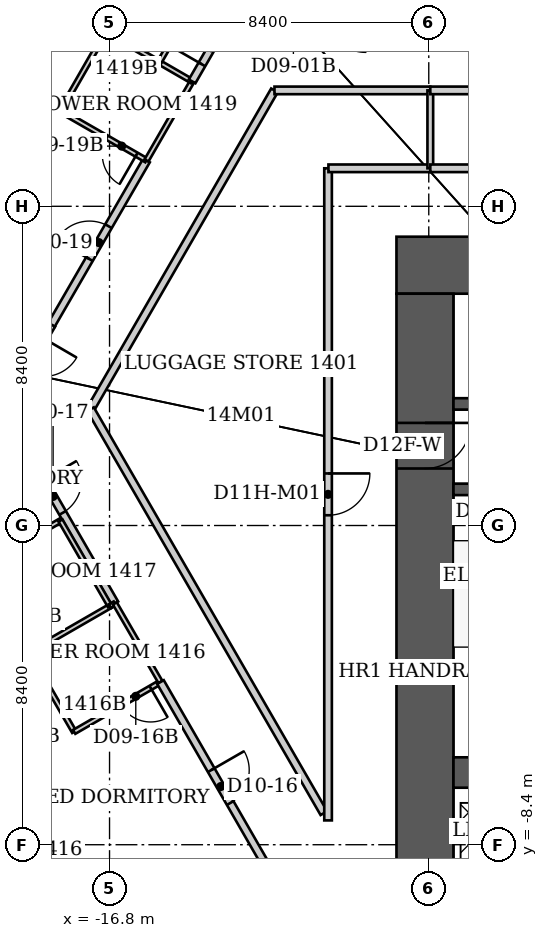
"""IFC4 building model, lengths in metres.
Left out: names, types, materials, properties, quantities, classifications, styles, units other than length and angle.
Written with IfcOpenShell. Run it as: python <this file> out.ifc"""

import sys

from ifc_helpers import new_model, si_unit, direction, frame, frame_2d, origin, place, context, subcontext, project, spatial, rectangle, extrude, element, fill, save


model = new_model("IFC4")
c1 = context("Model", 3, precision=1e-05, world=origin(), true_north=direction((0.0, 1.0)))
c2 = subcontext(c1, "Body", "Model", "MODEL_VIEW")
j1 = project(units=[si_unit("LENGTHUNIT", "METRE"), si_unit("PLANEANGLEUNIT", "RADIAN")], contexts=[c1])
p1 = place(None, origin())
s1 = spatial("IfcSite", under=j1, at=p1, CompositionType="ELEMENT")
p2 = place(p1, origin())
s2 = spatial("IfcBuilding", under=s1, at=p2, CompositionType="ELEMENT")
p3 = place(p2, frame((0.0, 0.0, 61.0)))
s3 = spatial("IfcBuildingStorey", under=s2, at=p3, CompositionType="ELEMENT", Elevation=61.0)
p4 = place(p3, frame((-9.25, 6.85, 0.0), z_axis=(0.0, 0.0, 1.0), x_axis=(1.0, 0.0, 0.0)))
e1 = element("IfcWall", 1, at=p4, inside=s3, PredefinedType="SHEAR", context=c2, shape_type="SweptSolid", body=[
    extrude(rectangle(XDim=18.5, YDim=1.5, at=frame_2d((9.25, 0.0))), origin(), (0.0, 0.0, 1.0), 3.8),
])
p5 = place(p3, frame((-8.5, -9.2, 0.0), z_axis=(0.0, 0.0, 1.0), x_axis=(0.0, 1.0, 0.0)))
e2 = element("IfcWall", 2, at=p5, inside=s3, PredefinedType="SHEAR", context=c2, shape_type="SweptSolid", body=[
    extrude(rectangle(XDim=15.3, YDim=1.5, at=frame_2d((7.65, 0.0))), origin(), (0.0, 0.0, 1.0), 3.8),
])
p6 = place(p5, frame((10.7, 0.0, 0.0)))
e3 = element("IfcOpeningElement", 3, at=p6, cuts=e2, PredefinedType="OPENING", context=c2, shape_type="SweptSolid", body=[
    extrude(rectangle(XDim=1.2, YDim=2.2, at=frame_2d((0.6, 1.1))), frame((0.0, 0.75, 0.0), z_axis=(0.0, -1.0, 0.0), x_axis=(1.0, 0.0, 0.0)), (0.0, 0.0, 1.0), 1.5),
])
p7 = place(p3, frame((-7.75, -6.5, 0.0), z_axis=(0.0, 0.0, 1.0), x_axis=(1.0, 0.0, 0.0)))
e4 = element("IfcWall", 4, at=p7, inside=s3, PredefinedType="SHEAR", context=c2, shape_type="SweptSolid", body=[
    extrude(rectangle(XDim=15.5, YDim=0.8, at=frame_2d((7.75, 0.0))), origin(), (0.0, 0.0, 1.0), 3.8),
])
p8 = place(p3, frame((-7.75, 0.95, 0.0), z_axis=(0.0, 0.0, 1.0), x_axis=(1.0, 0.0, 0.0)))
e5 = element("IfcWall", 5, at=p8, inside=s3, PredefinedType="SHEAR", context=c2, shape_type="SweptSolid", body=[
    extrude(rectangle(XDim=3.0, YDim=0.3, at=frame_2d((1.5, 0.0))), origin(), (0.0, 0.0, 1.0), 3.8),
])
p9 = place(p8, frame((0.85, 0.0, 0.0)))
e6 = element("IfcOpeningElement", 6, at=p9, cuts=e5, PredefinedType="OPENING", context=c2, shape_type="SweptSolid", body=[
    extrude(rectangle(XDim=1.0, YDim=2.2, at=frame_2d((0.5, 1.1))), frame((0.0, 0.15, 0.0), z_axis=(0.0, -1.0, 0.0), x_axis=(1.0, 0.0, 0.0)), (0.0, 0.0, 1.0), 0.3),
])
p10 = place(p3, frame((-7.75, 3.2, 0.0), z_axis=(0.0, 0.0, 1.0), x_axis=(1.0, 0.0, 0.0)))
e7 = element("IfcWall", 7, at=p10, inside=s3, PredefinedType="SHEAR", context=c2, shape_type="SweptSolid", body=[
    extrude(rectangle(XDim=15.5, YDim=0.3, at=frame_2d((7.75, 0.0))), origin(), (0.0, 0.0, 1.0), 3.8),
])
p11 = place(p10, frame((5.688, 0.0, 0.0)))
e8 = element("IfcOpeningElement", 8, at=p11, cuts=e7, PredefinedType="OPENING", context=c2, shape_type="SweptSolid", body=[
    extrude(rectangle(XDim=1.1, YDim=2.2, at=frame_2d((0.55, 1.1))), frame((0.0, 0.15, 0.0), z_axis=(0.0, -1.0, 0.0), x_axis=(1.0, 0.0, 0.0)), (0.0, 0.0, 1.0), 0.3),
])
p12 = place(p10, frame((8.288, 0.0, 0.0)))
e9 = element("IfcOpeningElement", 9, at=p12, cuts=e7, PredefinedType="OPENING", context=c2, shape_type="SweptSolid", body=[
    extrude(rectangle(XDim=1.1, YDim=2.2, at=frame_2d((0.55, 1.1))), frame((0.0, 0.15, 0.0), z_axis=(0.0, -1.0, 0.0), x_axis=(1.0, 0.0, 0.0)), (0.0, 0.0, 1.0), 0.3),
])
p13 = place(p10, frame((11.363, 0.0, 0.0)))
e10 = element("IfcOpeningElement", 10, at=p13, cuts=e7, PredefinedType="OPENING", context=c2, shape_type="SweptSolid", body=[
    extrude(rectangle(XDim=1.1, YDim=2.2, at=frame_2d((0.55, 1.1))), frame((0.0, 0.15, 0.0), z_axis=(0.0, -1.0, 0.0), x_axis=(1.0, 0.0, 0.0)), (0.0, 0.0, 1.0), 0.3),
])
p14 = place(p10, frame((13.962, 0.0, 0.0)))
e11 = element("IfcOpeningElement", 11, at=p14, cuts=e7, PredefinedType="OPENING", context=c2, shape_type="SweptSolid", body=[
    extrude(rectangle(XDim=1.1, YDim=2.2, at=frame_2d((0.55, 1.1))), frame((0.0, 0.15, 0.0), z_axis=(0.0, -1.0, 0.0), x_axis=(1.0, 0.0, 0.0)), (0.0, 0.0, 1.0), 0.3),
])
p15 = place(p3, frame((-23.69, 8.38, 0.0), z_axis=(0.0, 0.0, 1.0), x_axis=(0.865658018331, -0.500635791068, 0.0)))
e12 = element("IfcWall", 12, at=p15, inside=s3, PredefinedType="PARTITIONING", context=c2, shape_type="SweptSolid", body=[
    extrude(rectangle(XDim=6.177, YDim=0.2, at=frame_2d((3.088, 0.0))), origin(), (0.0, 0.0, 1.0), 3.64),
])
p16 = place(p3, frame((-19.61, 3.06, 0.0), z_axis=(0.0, 0.0, 1.0), x_axis=(0.499983910424, -0.866034692906, 0.0)))
e13 = element("IfcWall", 13, at=p16, inside=s3, PredefinedType="PARTITIONING", context=c2, shape_type="SweptSolid", body=[
    extrude(rectangle(XDim=5.901, YDim=0.2, at=frame_2d((2.95, 0.0))), origin(), (0.0, 0.0, 1.0), 3.64),
])
p17 = place(p16, frame((2.15, 0.0, 0.0)))
e14 = element("IfcOpeningElement", 14, at=p17, cuts=e13, PredefinedType="OPENING", context=c2, shape_type="SweptSolid", body=[
    extrude(rectangle(XDim=1.0, YDim=2.13, at=frame_2d((0.5, 1.065))), frame((0.0, 0.1, 0.0), z_axis=(0.0, -1.0, 0.0), x_axis=(1.0, 0.0, 0.0)), (0.0, 0.0, 1.0), 0.2),
])
p18 = place(p3, frame((-18.93, -3.36, 0.0), z_axis=(0.0, 0.0, 1.0), x_axis=(0.501547039172, -0.865130376012, 0.0)))
e15 = element("IfcWall", 15, at=p18, inside=s3, PredefinedType="PARTITIONING", context=c2, shape_type="SweptSolid", body=[
    extrude(rectangle(XDim=2.393, YDim=0.12, at=frame_2d((1.196, 0.0))), origin(), (0.0, 0.0, 1.0), 3.64),
])
p19 = place(p3, frame((-18.868, -3.324, 0.0), z_axis=(0.0, 0.0, 1.0), x_axis=(0.866133109688, 0.499813401482, 0.0)))
e16 = element("IfcWall", 16, at=p19, inside=s3, PredefinedType="PARTITIONING", context=c2, shape_type="SweptSolid", body=[
    extrude(rectangle(XDim=2.401, YDim=0.12, at=frame_2d((1.201, 0.0))), origin(), (0.0, 0.0, 1.0), 3.64),
])
p20 = place(p3, frame((-18.33, 5.28, 0.0), z_axis=(0.0, 0.0, 1.0), x_axis=(0.500685921526, 0.865629024459, 0.0)))
e17 = element("IfcWall", 17, at=p20, inside=s3, PredefinedType="PARTITIONING", context=c2, shape_type="SweptSolid", body=[
    extrude(rectangle(XDim=5.0, YDim=0.2, at=frame_2d((2.5, 0.0))), origin(), (0.0, 0.0, 1.0), 3.64),
])
p21 = place(p20, frame((2.0, 0.0, 0.0)))
e18 = element("IfcOpeningElement", 18, at=p21, cuts=e17, PredefinedType="OPENING", context=c2, shape_type="SweptSolid", body=[
    extrude(rectangle(XDim=1.0, YDim=2.13, at=frame_2d((0.5, 1.065))), frame((0.0, 0.1, 0.0), z_axis=(0.0, -1.0, 0.0), x_axis=(1.0, 0.0, 0.0)), (0.0, 0.0, 1.0), 0.2),
])
p22 = place(p3, frame((-18.32, 5.28, 0.0), z_axis=(0.0, 0.0, 1.0), x_axis=(-0.503140236709, -0.864204780249, 0.0)))
e19 = element("IfcWall", 19, at=p22, inside=s3, PredefinedType="PARTITIONING", context=c2, shape_type="SweptSolid", body=[
    extrude(rectangle(XDim=1.828, YDim=0.2, at=frame_2d((0.914, 0.0))), origin(), (0.0, 0.0, 1.0), 3.64),
])
p23 = place(p22, frame((0.414, 0.0, 0.0)))
e20 = element("IfcOpeningElement", 20, at=p23, cuts=e19, PredefinedType="OPENING", context=c2, shape_type="SweptSolid", body=[
    extrude(rectangle(XDim=1.0, YDim=2.13, at=frame_2d((0.5, 1.065))), frame((0.0, 0.1, 0.0), z_axis=(0.0, -1.0, 0.0), x_axis=(1.0, 0.0, 0.0)), (0.0, 0.0, 1.0), 0.2),
])
p24 = place(p3, frame((-18.09, 0.13, 0.0), z_axis=(0.0, 0.0, 1.0), x_axis=(-0.866177122335, -0.499737123639, 0.0)))
e21 = element("IfcWall", 21, at=p24, inside=s3, PredefinedType="PARTITIONING", context=c2, shape_type="SweptSolid", body=[
    extrude(rectangle(XDim=2.401, YDim=0.12, at=frame_2d((1.201, 0.0))), origin(), (0.0, 0.0, 1.0), 3.64),
])
p25 = place(p3, frame((-18.09, 10.91, 0.0), z_axis=(0.0, 0.0, 1.0), x_axis=(0.866856728041, -0.498557331759, 0.0)))
e22 = element("IfcWall", 22, at=p25, inside=s3, PredefinedType="PARTITIONING", context=c2, shape_type="SweptSolid", body=[
    extrude(rectangle(XDim=2.607, YDim=0.12, at=frame_2d((1.304, 0.0))), origin(), (0.0, 0.0, 1.0), 3.64),
])
p26 = place(p25, frame((1.407, 0.0, 0.0)))
e23 = element("IfcOpeningElement", 23, at=p26, cuts=e22, PredefinedType="OPENING", context=c2, shape_type="SweptSolid", body=[
    extrude(rectangle(XDim=0.9, YDim=2.03, at=frame_2d((0.45, 1.015))), frame((0.0, 0.06, 0.0), z_axis=(0.0, -1.0, 0.0), x_axis=(1.0, 0.0, 0.0)), (0.0, 0.0, 1.0), 0.12),
])
p27 = place(p3, frame((-17.73, -5.43, 0.0), z_axis=(0.0, 0.0, 1.0), x_axis=(0.866114241029, 0.499846097802, 0.0)))
e24 = element("IfcWall", 24, at=p27, inside=s3, PredefinedType="PARTITIONING", context=c2, shape_type="SweptSolid", body=[
    extrude(rectangle(XDim=2.621, YDim=0.12, at=frame_2d((1.311, 0.0))), origin(), (0.0, 0.0, 1.0), 2.878),
])
p28 = place(p27, frame((1.421, 0.0, 0.0)))
e25 = element("IfcOpeningElement", 25, at=p28, cuts=e24, PredefinedType="OPENING", context=c2, shape_type="SweptSolid", body=[
    extrude(rectangle(XDim=0.9, YDim=2.03, at=frame_2d((0.45, 1.015))), frame((0.0, 0.06, 0.0), z_axis=(0.0, -1.0, 0.0), x_axis=(1.0, 0.0, 0.0)), (0.0, 0.0, 1.0), 0.12),
])
p29 = place(p3, frame((-17.3, 3.06, 0.0), z_axis=(0.0, 0.0, 1.0), x_axis=(0.499704269421, 0.866196076603, 0.0)))
e26 = element("IfcWall", 26, at=p29, inside=s3, PredefinedType="PARTITIONING", context=c2, shape_type="SweptSolid", body=[
    extrude(rectangle(XDim=9.686, YDim=0.2, at=frame_2d((4.843, 0.0))), origin(), (0.0, 0.0, 1.0), 3.64),
])
p30 = place(p3, frame((-16.89, 13.0, 0.0), z_axis=(0.0, 0.0, 1.0), x_axis=(-0.497970509195, -0.867193964446, 0.0)))
e27 = element("IfcWall", 27, at=p30, inside=s3, PredefinedType="PARTITIONING", context=c2, shape_type="SweptSolid", body=[
    extrude(rectangle(XDim=2.41, YDim=0.12, at=frame_2d((1.205, 0.0))), origin(), (0.0, 0.0, 1.0), 3.64),
])
p31 = place(p3, frame((-16.89, 13.0, 0.0), z_axis=(0.0, 0.0, 1.0), x_axis=(0.864822777425, -0.502077248685, 0.0)))
e28 = element("IfcWall", 28, at=p31, inside=s3, PredefinedType="PARTITIONING", context=c2, shape_type="SweptSolid", body=[
    extrude(rectangle(XDim=1.617, YDim=0.12, at=frame_2d((0.809, 0.0))), origin(), (0.0, 0.0, 1.0), 3.64),
])
p32 = place(p3, frame((-16.79, -2.12, 0.0), z_axis=(0.0, 0.0, 1.0), x_axis=(-0.50025099007, 0.865880446098, 0.0)))
e29 = element("IfcWall", 29, at=p32, inside=s3, PredefinedType="PARTITIONING", context=c2, shape_type="SweptSolid", body=[
    extrude(rectangle(XDim=2.599, YDim=0.12, at=frame_2d((1.299, 0.0))), origin(), (0.0, 0.0, 1.0), 3.64),
])
p33 = place(p3, frame((-16.788, -2.124, 0.0), z_axis=(0.0, 0.0, 1.0), x_axis=(0.866405716731, 0.499340699338, 0.0)))
e30 = element("IfcWall", 30, at=p33, inside=s3, PredefinedType="PARTITIONING", context=c2, shape_type="SweptSolid", body=[
    extrude(rectangle(XDim=0.148, YDim=0.12, at=frame_2d((0.074, 0.0))), origin(), (0.0, 0.0, 1.0), 3.64),
])
p34 = place(p3, frame((-16.66, -2.05, 0.0), z_axis=(0.0, 0.0, 1.0), x_axis=(0.501502765098, -0.865156041763, 0.0)))
e31 = element("IfcWall", 31, at=p34, inside=s3, PredefinedType="PARTITIONING", context=c2, shape_type="SweptSolid", body=[
    extrude(rectangle(XDim=2.393, YDim=0.12, at=frame_2d((1.196, 0.0))), origin(), (0.0, 0.0, 1.0), 3.64),
])
p35 = place(p3, frame((-15.827, 9.608, 0.0), z_axis=(0.0, 0.0, 1.0), x_axis=(0.499737123639, 0.866177122335, 0.0)))
e32 = element("IfcWall", 32, at=p35, inside=s3, PredefinedType="PARTITIONING", context=c2, shape_type="SweptSolid", body=[
    extrude(rectangle(XDim=2.401, YDim=0.12, at=frame_2d((1.201, 0.0))), origin(), (0.0, 0.0, 1.0), 3.64),
])
p36 = place(p3, frame((-15.491, 12.188, 0.0), z_axis=(0.0, 0.0, 1.0), x_axis=(0.865633452576, -0.500678265737, 0.0)))
e33 = element("IfcWall", 33, at=p36, inside=s3, PredefinedType="PARTITIONING", context=c2, shape_type="SweptSolid", body=[
    extrude(rectangle(XDim=0.995, YDim=0.12, at=frame_2d((0.497, 0.0))), origin(), (0.0, 0.0, 1.0), 3.64),
])
p37 = place(p3, frame((-15.49, 12.19, 0.0), z_axis=(0.0, 0.0, 1.0), x_axis=(0.499407914056, 0.866366975004, 0.0)))
e34 = element("IfcWall", 34, at=p37, inside=s3, PredefinedType="PARTITIONING", context=c2, shape_type="SweptSolid", body=[
    extrude(rectangle(XDim=2.643, YDim=0.12, at=frame_2d((1.322, 0.0))), origin(), (0.0, 0.0, 1.0), 3.64),
])
p38 = place(p3, frame((-15.46, -4.12, 0.0), z_axis=(0.0, 0.0, 1.0), x_axis=(0.499320644457, -0.866417274769, 0.0)))
e35 = element("IfcWall", 35, at=p38, inside=s3, PredefinedType="PARTITIONING", context=c2, shape_type="SweptSolid", body=[
    extrude(rectangle(XDim=6.348, YDim=0.2, at=frame_2d((3.174, 0.0))), origin(), (0.0, 0.0, 1.0), 3.64),
])
p39 = place(p38, frame((2.674, 0.0, 0.0)))
e36 = element("IfcOpeningElement", 36, at=p39, cuts=e35, PredefinedType="OPENING", context=c2, shape_type="SweptSolid", body=[
    extrude(rectangle(XDim=1.0, YDim=2.13, at=frame_2d((0.5, 1.065))), frame((0.0, 0.1, 0.0), z_axis=(0.0, -1.0, 0.0), x_axis=(1.0, 0.0, 0.0)), (0.0, 0.0, 1.0), 0.2),
])
p40 = place(p3, frame((-14.627, 11.688, 0.0), z_axis=(0.0, 0.0, 1.0), x_axis=(0.49975362313, 0.866167602816, 0.0)))
e37 = element("IfcWall", 37, at=p40, inside=s3, PredefinedType="PARTITIONING", context=c2, shape_type="SweptSolid", body=[
    extrude(rectangle(XDim=2.034, YDim=0.2, at=frame_2d((1.017, 0.0))), origin(), (0.0, 0.0, 1.0), 3.64),
])
p41 = place(p40, frame((0.517, 0.0, 0.0)))
e38 = element("IfcOpeningElement", 38, at=p41, cuts=e37, PredefinedType="OPENING", context=c2, shape_type="SweptSolid", body=[
    extrude(rectangle(XDim=1.0, YDim=2.13, at=frame_2d((0.5, 1.065))), frame((0.0, 0.1, 0.0), z_axis=(0.0, -1.0, 0.0), x_axis=(1.0, 0.0, 0.0)), (0.0, 0.0, 1.0), 0.2),
])
p42 = place(p3, frame((-12.46, 11.45, 0.0), z_axis=(0.0, 0.0, 1.0), x_axis=(1.0, 0.0, 0.0)))
e39 = element("IfcWall", 39, at=p42, inside=s3, PredefinedType="PARTITIONING", context=c2, shape_type="SweptSolid", body=[
    extrude(rectangle(XDim=4.1, YDim=0.2, at=frame_2d((2.05, 0.0))), origin(), (0.0, 0.0, 1.0), 3.64),
])
p43 = place(p3, frame((-11.16, -7.57, 0.0), z_axis=(0.0, 0.0, 1.0), x_axis=(-0.500175206663, 0.865924224537, 0.0)))
e40 = element("IfcWall", 40, at=p43, inside=s3, PredefinedType="PARTITIONING", context=c2, shape_type="SweptSolid", body=[
    extrude(rectangle(XDim=12.275, YDim=0.2, at=frame_2d((6.138, 0.0))), origin(), (0.0, 0.0, 1.0), 3.64),
])
p44 = place(p3, frame((-11.05, 9.4, 0.0), z_axis=(0.0, 0.0, 1.0), x_axis=(0.0, -1.0, 0.0)))
e41 = element("IfcWall", 41, at=p44, inside=s3, PredefinedType="PARTITIONING", context=c2, shape_type="SweptSolid", body=[
    extrude(rectangle(XDim=17.16, YDim=0.2, at=frame_2d((8.58, 0.0))), origin(), (0.0, 0.0, 1.0), 3.64),
])
p45 = place(p44, frame((8.03, 0.0, 0.0)))
e42 = element("IfcOpeningElement", 42, at=p45, cuts=e41, PredefinedType="OPENING", context=c2, shape_type="SweptSolid", body=[
    extrude(rectangle(XDim=1.1, YDim=2.2, at=frame_2d((0.55, 1.1))), frame((0.0, 0.1, 0.0), z_axis=(0.0, -1.0, 0.0), x_axis=(1.0, 0.0, 0.0)), (0.0, 0.0, 1.0), 0.2),
])
p46 = place(p3, frame((-8.36, 9.4, 0.0), z_axis=(0.0, 0.0, 1.0), x_axis=(-1.0, 0.0, 0.0)))
e43 = element("IfcWall", 43, at=p46, inside=s3, PredefinedType="PARTITIONING", context=c2, shape_type="SweptSolid", body=[
    extrude(rectangle(XDim=2.68, YDim=0.2, at=frame_2d((1.34, 0.0))), origin(), (0.0, 0.0, 1.0), 3.64),
])
p47 = place(p3, frame((-8.36, 11.45, 0.0), z_axis=(0.0, 0.0, 1.0), x_axis=(0.0, -1.0, 0.0)))
e44 = element("IfcWall", 44, at=p47, inside=s3, PredefinedType="PARTITIONING", context=c2, shape_type="SweptSolid", body=[
    extrude(rectangle(XDim=2.05, YDim=0.15, at=frame_2d((1.025, 0.0))), origin(), (0.0, 0.0, 1.0), 2.878),
])
p48 = place(p3, frame((-8.36, 11.45, 0.0), z_axis=(0.0, 0.0, 1.0), x_axis=(1.0, 0.0, 0.0)))
e45 = element("IfcWall", 45, at=p48, inside=s3, PredefinedType="PARTITIONING", context=c2, shape_type="SweptSolid", body=[
    extrude(rectangle(XDim=8.94, YDim=0.2, at=frame_2d((4.47, 0.0))), origin(), (0.0, 0.0, 1.0), 3.64),
])
p49 = place(p48, frame((3.92, 0.0, 0.0)))
e46 = element("IfcOpeningElement", 46, at=p49, cuts=e45, PredefinedType="OPENING", context=c2, shape_type="SweptSolid", body=[
    extrude(rectangle(XDim=1.1, YDim=2.2, at=frame_2d((0.55, 1.1))), frame((0.0, 0.1, 0.0), z_axis=(0.0, -1.0, 0.0), x_axis=(1.0, 0.0, 0.0)), (0.0, 0.0, 1.0), 0.2),
])
p50 = place(p3, frame((0.58, 9.4, 0.0), z_axis=(0.0, 0.0, 1.0), x_axis=(-1.0, 0.0, 0.0)))
e47 = element("IfcWall", 47, at=p50, inside=s3, PredefinedType="PARTITIONING", context=c2, shape_type="SweptSolid", body=[
    extrude(rectangle(XDim=8.94, YDim=0.2, at=frame_2d((4.47, 0.0))), origin(), (0.0, 0.0, 1.0), 3.64),
])
p51 = place(p39, origin())
e48 = element("IfcDoor", 48, at=p51, inside=s3, OperationType="SINGLE_SWING_LEFT", PredefinedType="DOOR", context=c2, shape_type="SweptSolid", body=[
    extrude(rectangle(XDim=1.0, YDim=2.13, at=frame_2d((0.5, 1.065))), frame((0.0, 0.025, 0.0), z_axis=(0.0, -1.0, 0.0), x_axis=(1.0, 0.0, 0.0)), (0.0, 0.0, 1.0), 0.05),
])
fill(e36, e48)
p52 = place(p28, origin())
e49 = element("IfcDoor", 49, at=p52, inside=s3, OperationType="SINGLE_SWING_RIGHT", PredefinedType="DOOR", context=c2, shape_type="SweptSolid", body=[
    extrude(rectangle(XDim=0.9, YDim=2.03, at=frame_2d((0.45, 1.015))), frame((0.0, 0.025, 0.0), z_axis=(0.0, -1.0, 0.0), x_axis=(1.0, 0.0, 0.0)), (0.0, 0.0, 1.0), 0.05),
])
fill(e25, e49)
p53 = place(p17, origin())
e50 = element("IfcDoor", 50, at=p53, inside=s3, OperationType="SINGLE_SWING_LEFT", PredefinedType="DOOR", context=c2, shape_type="SweptSolid", body=[
    extrude(rectangle(XDim=1.0, YDim=2.13, at=frame_2d((0.5, 1.065))), frame((0.0, 0.025, 0.0), z_axis=(0.0, -1.0, 0.0), x_axis=(1.0, 0.0, 0.0)), (0.0, 0.0, 1.0), 0.05),
])
fill(e14, e50)
p54 = place(p21, origin())
e51 = element("IfcDoor", 51, at=p54, inside=s3, OperationType="SINGLE_SWING_LEFT", PredefinedType="DOOR", context=c2, shape_type="SweptSolid", body=[
    extrude(rectangle(XDim=1.0, YDim=2.13, at=frame_2d((0.5, 1.065))), frame((0.0, 0.025, 0.0), z_axis=(0.0, -1.0, 0.0), x_axis=(1.0, 0.0, 0.0)), (0.0, 0.0, 1.0), 0.05),
])
fill(e18, e51)
p55 = place(p26, origin())
e52 = element("IfcDoor", 52, at=p55, inside=s3, OperationType="SINGLE_SWING_RIGHT", PredefinedType="DOOR", context=c2, shape_type="SweptSolid", body=[
    extrude(rectangle(XDim=0.9, YDim=2.03, at=frame_2d((0.45, 1.015))), frame((0.0, 0.025, 0.0), z_axis=(0.0, -1.0, 0.0), x_axis=(1.0, 0.0, 0.0)), (0.0, 0.0, 1.0), 0.05),
])
fill(e23, e52)
p56 = place(p41, origin())
e53 = element("IfcDoor", 53, at=p56, inside=s3, OperationType="SINGLE_SWING_LEFT", PredefinedType="DOOR", context=c2, shape_type="SweptSolid", body=[
    extrude(rectangle(XDim=1.0, YDim=2.13, at=frame_2d((0.5, 1.065))), frame((0.0, 0.025, 0.0), z_axis=(0.0, -1.0, 0.0), x_axis=(1.0, 0.0, 0.0)), (0.0, 0.0, 1.0), 0.05),
])
fill(e38, e53)
p57 = place(p45, origin())
e54 = element("IfcDoor", 54, at=p57, inside=s3, OperationType="SINGLE_SWING_LEFT", PredefinedType="DOOR", context=c2, shape_type="SweptSolid", body=[
    extrude(rectangle(XDim=1.1, YDim=2.2, at=frame_2d((0.55, 1.1))), frame((0.0, 0.025, 0.0), z_axis=(0.0, -1.0, 0.0), x_axis=(1.0, 0.0, 0.0)), (0.0, 0.0, 1.0), 0.05),
])
fill(e42, e54)
p58 = place(p6, origin())
e55 = element("IfcDoor", 55, at=p58, inside=s3, OperationType="SINGLE_SWING_RIGHT", PredefinedType="DOOR", context=c2, shape_type="SweptSolid", body=[
    extrude(rectangle(XDim=1.2, YDim=2.2, at=frame_2d((0.6, 1.1))), frame((0.0, 0.025, 0.0), z_axis=(0.0, -1.0, 0.0), x_axis=(1.0, 0.0, 0.0)), (0.0, 0.0, 1.0), 0.05),
])
fill(e3, e55)
save(model, sys.argv[1])
